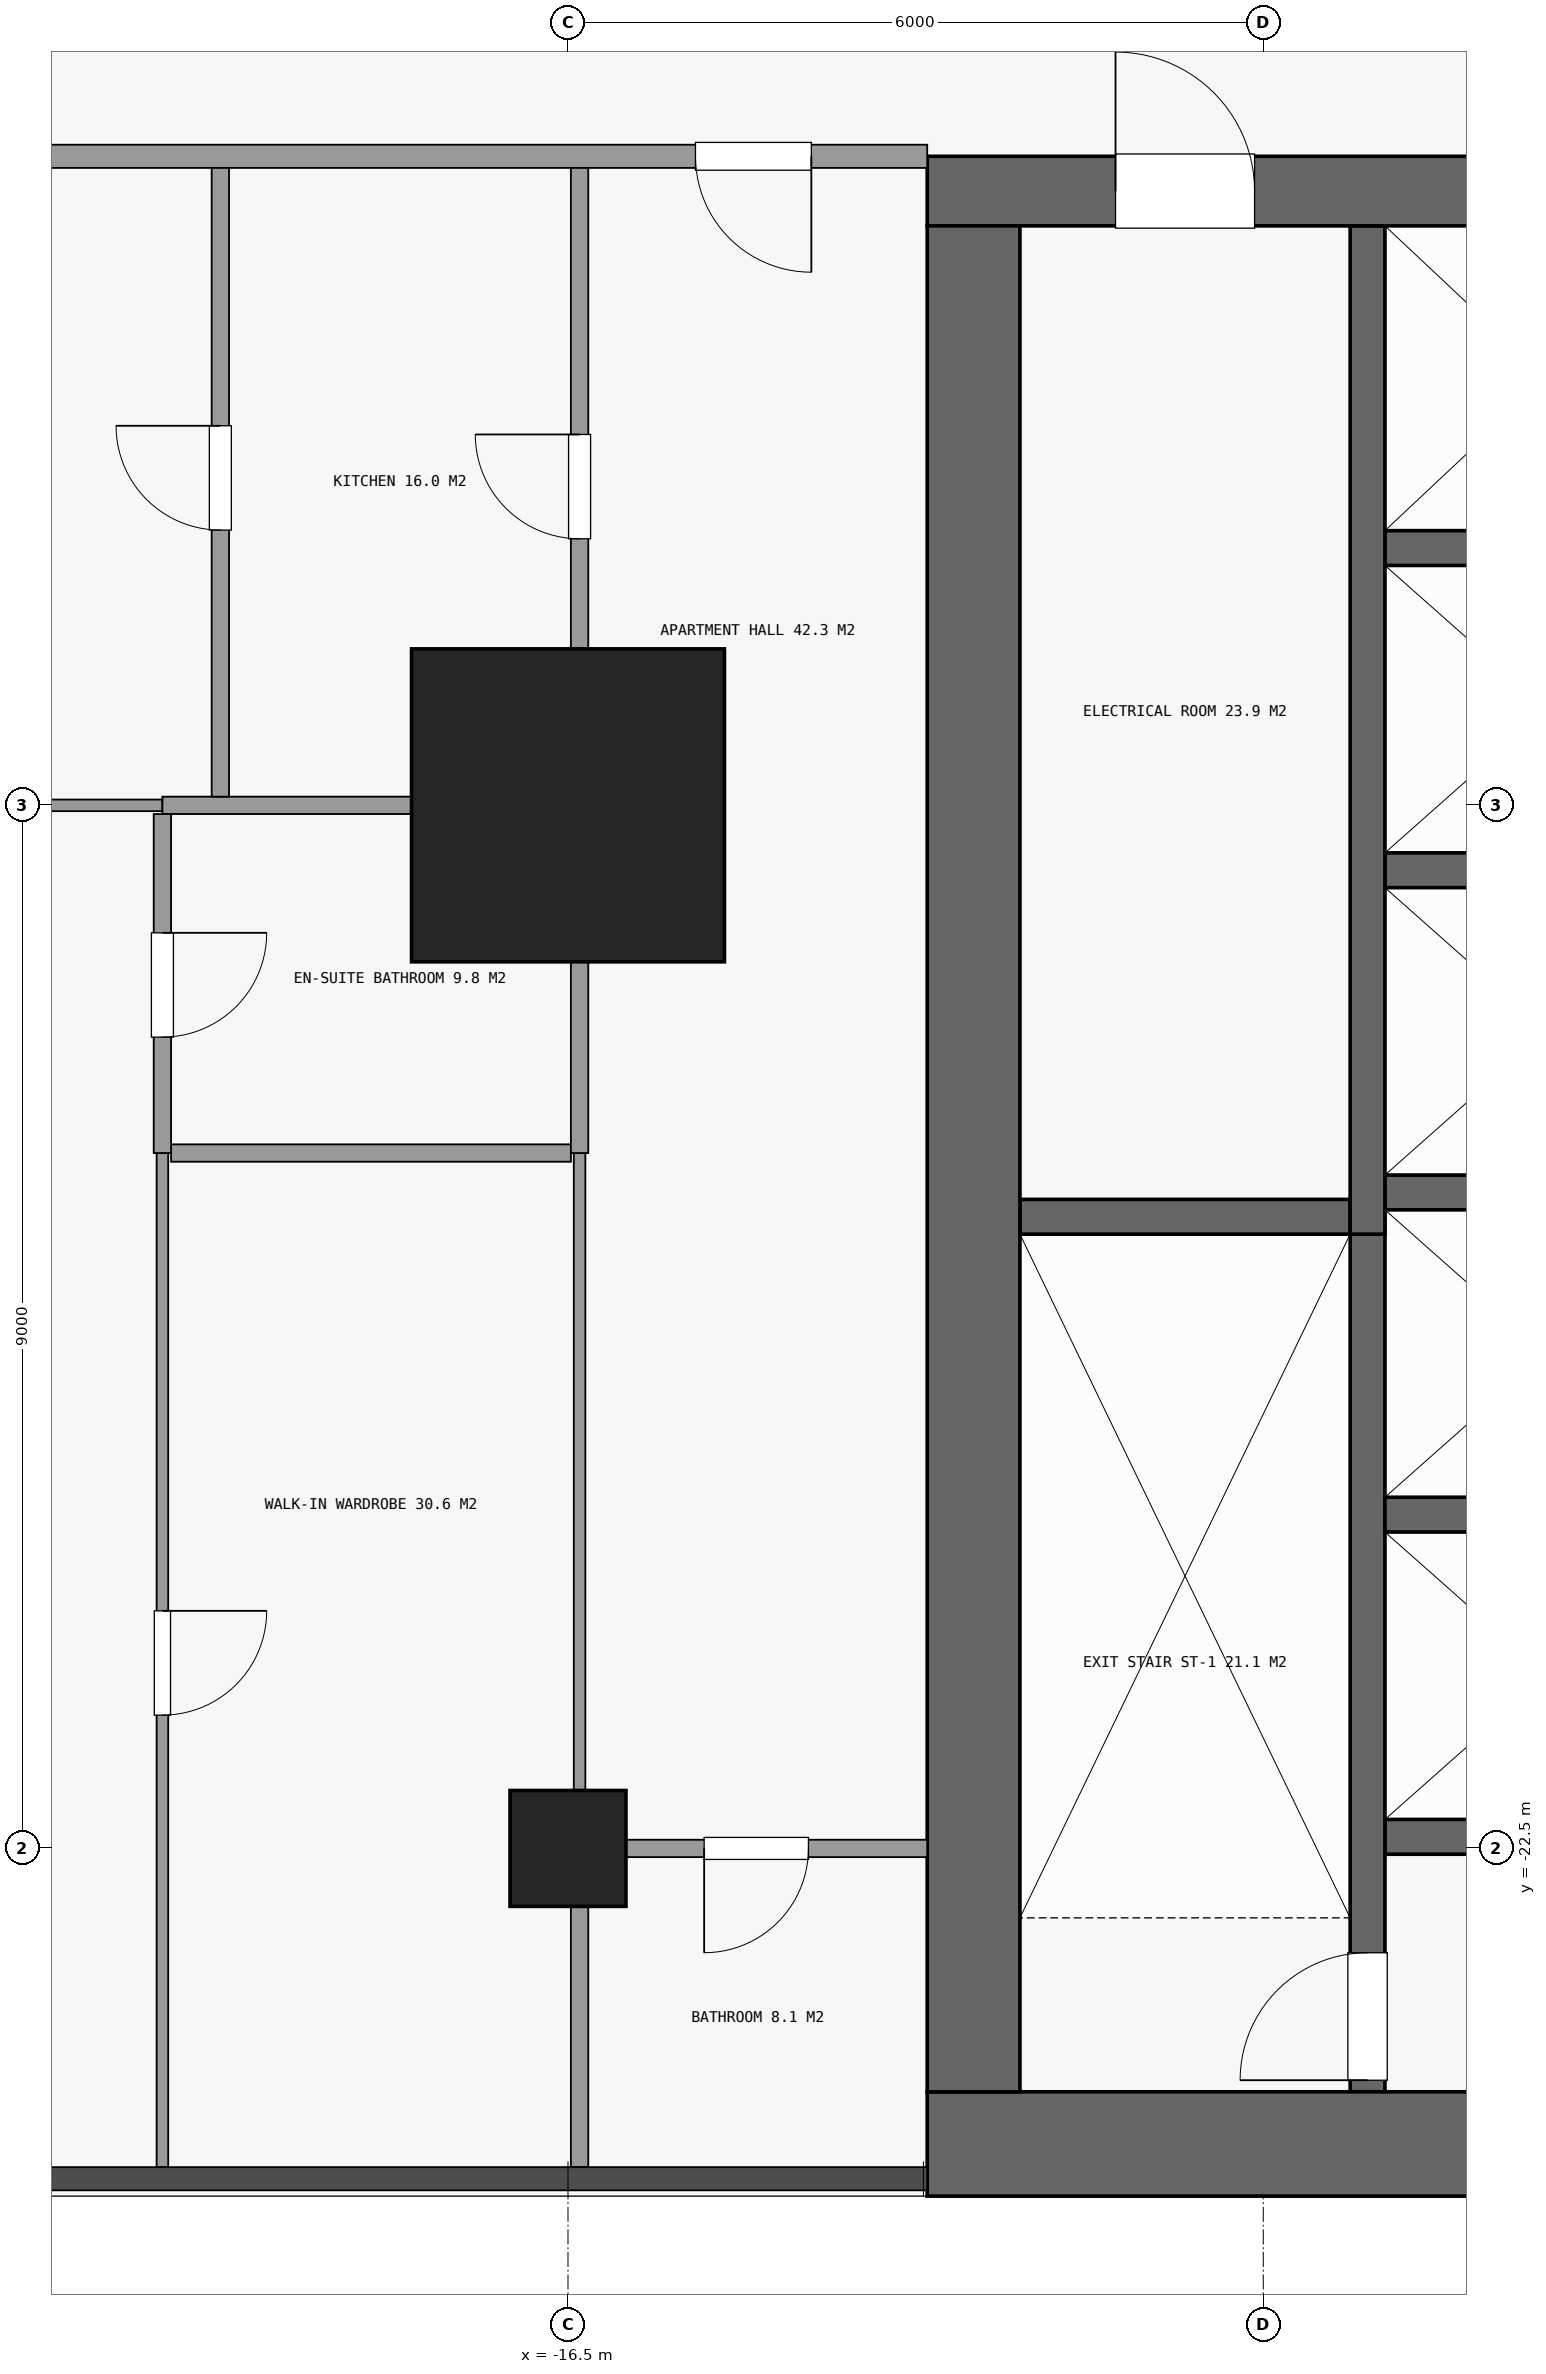
"""IFC4 building model, lengths in metres.
Left out: names, types, materials, properties, quantities, classifications, styles, units other than length and angle.
Written with IfcOpenShell. Run it as: python <this file> out.ifc"""

import sys

from ifc_helpers import new_model, si_unit, direction, frame, frame_2d, origin, origin_2d, place, context, subcontext, project, spatial, rectangle, extrude, element, fill, save


model = new_model("IFC4")
c1 = context("Model", 3, precision=1e-05, world=origin(), true_north=direction((0.0, 1.0)))
c2 = subcontext(c1, "Body", "Model", "MODEL_VIEW")
j1 = project(units=[si_unit("LENGTHUNIT", "METRE"), si_unit("PLANEANGLEUNIT", "RADIAN")], contexts=[c1])
p1 = place(None, origin())
s1 = spatial("IfcSite", under=j1, at=p1, CompositionType="ELEMENT")
p2 = place(p1, origin())
s2 = spatial("IfcBuilding", under=s1, at=p2, CompositionType="ELEMENT")
p3 = place(p2, frame((0.0, 0.0, 113.5)))
s3 = spatial("IfcBuildingStorey", under=s2, at=p3, CompositionType="ELEMENT", Elevation=113.5)
p4 = place(p3, frame((-16.5, -22.5, 0.0), z_axis=(0.0, 0.0, 1.0), x_axis=(1.0, 0.0, 0.0)))
e1 = element("IfcColumn", 1, at=p4, inside=s3, PredefinedType="COLUMN", context=c2, shape_type="SweptSolid", body=[
    extrude(rectangle(XDim=1.0, YDim=1.0, at=origin_2d()), origin(), (0.0, 0.0, 1.0), 3.6),
])
p5 = place(p3, frame((-16.5, -13.5, 0.0), z_axis=(0.0, 0.0, 1.0), x_axis=(1.0, 0.0, 0.0)))
e2 = element("IfcColumn", 2, at=p5, inside=s3, PredefinedType="COLUMN", context=c2, shape_type="SweptSolid", body=[
    extrude(rectangle(XDim=2.7, YDim=2.7, at=origin_2d()), origin(), (0.0, 0.0, 1.0), 3.6),
])
p6 = place(p3, frame((-13.4, -25.05, 0.0), z_axis=(0.0, 0.0, 1.0), x_axis=(1.0, 0.0, 0.0)))
e3 = element("IfcWall", 3, at=p6, inside=s3, PredefinedType="SHEAR", context=c2, shape_type="SweptSolid", body=[
    extrude(rectangle(XDim=26.8, YDim=0.9, at=frame_2d((13.4, 0.0))), origin(), (0.0, 0.0, 1.0), 3.3),
])
p7 = place(p3, frame((-13.4, -8.2, 0.0), z_axis=(0.0, 0.0, 1.0), x_axis=(1.0, 0.0, 0.0)))
e4 = element("IfcWall", 4, at=p7, inside=s3, PredefinedType="SHEAR", context=c2, shape_type="SweptSolid", body=[
    extrude(rectangle(XDim=26.8, YDim=0.6, at=frame_2d((13.4, 0.0))), origin(), (0.0, 0.0, 1.0), 3.3),
])
p8 = place(p7, frame((7.7, 0.0, 0.0)))
e5 = element("IfcOpeningElement", 5, at=p8, cuts=e4, PredefinedType="OPENING", context=c2, shape_type="SweptSolid", body=[
    extrude(rectangle(XDim=1.8, YDim=2.1, at=frame_2d((0.9, 1.05))), frame((0.0, 0.31, 0.0), z_axis=(0.0, -1.0, 0.0), x_axis=(1.0, 0.0, 0.0)), (0.0, 0.0, 1.0), 0.62),
])
p9 = place(p7, frame((17.3, 0.0, 0.0)))
e6 = element("IfcOpeningElement", 6, at=p9, cuts=e4, PredefinedType="OPENING", context=c2, shape_type="SweptSolid", body=[
    extrude(rectangle(XDim=1.8, YDim=2.1, at=frame_2d((0.9, 1.05))), frame((0.0, 0.31, 0.0), z_axis=(0.0, -1.0, 0.0), x_axis=(1.0, 0.0, 0.0)), (0.0, 0.0, 1.0), 0.62),
])
p10 = place(p7, frame((1.625, 0.0, 0.0)))
e7 = element("IfcOpeningElement", 7, at=p10, cuts=e4, PredefinedType="OPENING", context=c2, shape_type="SweptSolid", body=[
    extrude(rectangle(XDim=1.2, YDim=2.1, at=frame_2d((0.6, 1.05))), frame((0.0, 0.31, 0.0), z_axis=(0.0, -1.0, 0.0), x_axis=(1.0, 0.0, 0.0)), (0.0, 0.0, 1.0), 0.62),
])
p11 = place(p7, frame((23.275, 0.0, 0.0)))
e8 = element("IfcOpeningElement", 8, at=p11, cuts=e4, PredefinedType="OPENING", context=c2, shape_type="SweptSolid", body=[
    extrude(rectangle(XDim=0.9, YDim=2.1, at=frame_2d((0.45, 1.05))), frame((0.0, 0.31, 0.0), z_axis=(0.0, -1.0, 0.0), x_axis=(1.0, 0.0, 0.0)), (0.0, 0.0, 1.0), 0.62),
])
p12 = place(p3, frame((-13.0, -24.6, 0.0), z_axis=(0.0, 0.0, 1.0), x_axis=(0.0, 1.0, 0.0)))
e9 = element("IfcWall", 9, at=p12, inside=s3, PredefinedType="SHEAR", context=c2, shape_type="SweptSolid", body=[
    extrude(rectangle(XDim=16.1, YDim=0.8, at=frame_2d((8.05, 0.0))), origin(), (0.0, 0.0, 1.0), 3.3),
])
for number, where, z_axis, x_axis in (
    (10, (-9.45, -22.4, 0.0), (0.0, 0.0, 1.0), (1.0, 0.0, 0.0)),
    (11, (-9.45, -19.62, 0.0), (0.0, 0.0, 1.0), (1.0, 0.0, 0.0)),
):
    element("IfcWall", number, at=place(p3, frame(where, z_axis=z_axis, x_axis=x_axis)), inside=s3, PredefinedType="SHEAR", context=c2, shape_type="SweptSolid", body=[
        extrude(rectangle(XDim=2.8, YDim=0.3, at=frame_2d((1.4, 0.0))), origin(), (0.0, 0.0, 1.0), 3.3),
    ])
p13 = place(p3, frame((-12.6, -17.05, 0.0), z_axis=(0.0, 0.0, 1.0), x_axis=(1.0, 0.0, 0.0)))
e12 = element("IfcWall", 12, at=p13, inside=s3, PredefinedType="SHEAR", context=c2, shape_type="SweptSolid", body=[
    extrude(rectangle(XDim=2.85, YDim=0.3, at=frame_2d((1.425, 0.0))), origin(), (0.0, 0.0, 1.0), 3.3),
])
for number, where, z_axis, x_axis in (
    (13, (-9.45, -16.84, 0.0), (0.0, 0.0, 1.0), (1.0, 0.0, 0.0)),
    (14, (-9.45, -14.06, 0.0), (0.0, 0.0, 1.0), (1.0, 0.0, 0.0)),
    (15, (-9.45, -11.28, 0.0), (0.0, 0.0, 1.0), (1.0, 0.0, 0.0)),
):
    element("IfcWall", number, at=place(p3, frame(where, z_axis=z_axis, x_axis=x_axis)), inside=s3, PredefinedType="SHEAR", context=c2, shape_type="SweptSolid", body=[
        extrude(rectangle(XDim=2.8, YDim=0.3, at=frame_2d((1.4, 0.0))), origin(), (0.0, 0.0, 1.0), 3.3),
    ])
p14 = place(p3, frame((-9.6, -24.6, 0.0), z_axis=(0.0, 0.0, 1.0), x_axis=(0.0, 1.0, 0.0)))
e16 = element("IfcWall", 16, at=p14, inside=s3, PredefinedType="SHEAR", context=c2, shape_type="SweptSolid", body=[
    extrude(rectangle(XDim=7.7, YDim=0.3, at=frame_2d((3.85, 0.0))), origin(), (0.0, 0.0, 1.0), 3.3),
])
p15 = place(p14, frame((0.1, 0.0, 0.0)))
e17 = element("IfcOpeningElement", 17, at=p15, cuts=e16, PredefinedType="OPENING", context=c2, shape_type="SweptSolid", body=[
    extrude(rectangle(XDim=1.1, YDim=2.1, at=frame_2d((0.55, 1.05))), frame((0.0, 0.16, 0.0), z_axis=(0.0, -1.0, 0.0), x_axis=(1.0, 0.0, 0.0)), (0.0, 0.0, 1.0), 0.32),
])
p16 = place(p3, frame((-9.6, -17.2, 0.0), z_axis=(0.0, 0.0, 1.0), x_axis=(0.0, 1.0, 0.0)))
e18 = element("IfcWall", 18, at=p16, inside=s3, PredefinedType="SHEAR", context=c2, shape_type="SweptSolid", body=[
    extrude(rectangle(XDim=8.7, YDim=0.3, at=frame_2d((4.35, 0.0))), origin(), (0.0, 0.0, 1.0), 3.3),
])
p17 = place(p3, frame((-16.325, -22.5, 0.0), z_axis=(0.0, 0.0, 1.0), x_axis=(1.0, 0.0, 0.0)))
e19 = element("IfcWall", 19, at=p17, inside=s3, PredefinedType="PARTITIONING", context=c2, shape_type="SweptSolid", body=[
    extrude(rectangle(XDim=2.925, YDim=0.15, at=frame_2d((1.462, 0.0))), origin(), (0.0, 0.0, 1.0), 3.3),
])
p18 = place(p17, frame((1.0, 0.0, 0.0)))
e20 = element("IfcOpeningElement", 20, at=p18, cuts=e19, PredefinedType="OPENING", context=c2, shape_type="SweptSolid", body=[
    extrude(rectangle(XDim=0.9, YDim=2.1, at=frame_2d((0.45, 1.05))), frame((0.0, 0.085, 0.0), z_axis=(0.0, -1.0, 0.0), x_axis=(1.0, 0.0, 0.0)), (0.0, 0.0, 1.0), 0.17),
])
p19 = place(p3, frame((-19.925, -16.5, 0.0), z_axis=(0.0, 0.0, 1.0), x_axis=(1.0, 0.0, 0.0)))
e21 = element("IfcWall", 21, at=p19, inside=s3, PredefinedType="PARTITIONING", context=c2, shape_type="SweptSolid", body=[
    extrude(rectangle(XDim=3.45, YDim=0.15, at=frame_2d((1.725, 0.0))), origin(), (0.0, 0.0, 1.0), 3.3),
])
p20 = place(p3, frame((-25.25, -13.5, 0.0), z_axis=(0.0, 0.0, 1.0), x_axis=(1.0, 0.0, 0.0)))
e22 = element("IfcWall", 22, at=p20, inside=s3, PredefinedType="PARTITIONING", context=c2, shape_type="SweptSolid", body=[
    extrude(rectangle(XDim=5.25, YDim=0.1, at=frame_2d((2.625, 0.0))), origin(), (0.0, 0.0, 1.0), 3.3),
])
p21 = place(p20, frame((1.2, 0.0, 0.0)))
e23 = element("IfcOpeningElement", 23, at=p21, cuts=e22, PredefinedType="OPENING", context=c2, shape_type="SweptSolid", body=[
    extrude(rectangle(XDim=0.9, YDim=2.1, at=frame_2d((0.45, 1.05))), frame((0.0, 0.06, 0.0), z_axis=(0.0, -1.0, 0.0), x_axis=(1.0, 0.0, 0.0)), (0.0, 0.0, 1.0), 0.12),
])
p22 = place(p3, frame((-20.0, -13.5, 0.0), z_axis=(0.0, 0.0, 1.0), x_axis=(1.0, 0.0, 0.0)))
e24 = element("IfcWall", 24, at=p22, inside=s3, PredefinedType="PARTITIONING", context=c2, shape_type="SweptSolid", body=[
    extrude(rectangle(XDim=3.525, YDim=0.15, at=frame_2d((1.762, 0.0))), origin(), (0.0, 0.0, 1.0), 3.3),
])
p23 = place(p3, frame((-26.15, -7.9, 0.0), z_axis=(0.0, 0.0, 1.0), x_axis=(1.0, 0.0, 0.0)))
e25 = element("IfcWall", 25, at=p23, inside=s3, PredefinedType="PARTITIONING", context=c2, shape_type="SweptSolid", body=[
    extrude(rectangle(XDim=12.75, YDim=0.2, at=frame_2d((6.375, 0.0))), origin(), (0.0, 0.0, 1.0), 3.3),
])
p24 = place(p23, frame((10.75, 0.0, 0.0)))
e26 = element("IfcOpeningElement", 26, at=p24, cuts=e25, PredefinedType="OPENING", context=c2, shape_type="SweptSolid", body=[
    extrude(rectangle(XDim=1.0, YDim=2.1, at=frame_2d((0.5, 1.05))), frame((0.0, 0.11, 0.0), z_axis=(0.0, -1.0, 0.0), x_axis=(1.0, 0.0, 0.0)), (0.0, 0.0, 1.0), 0.22),
])
p25 = place(p3, frame((-20.0, -25.25, 0.0), z_axis=(0.0, 0.0, 1.0), x_axis=(0.0, 1.0, 0.0)))
e27 = element("IfcWall", 27, at=p25, inside=s3, PredefinedType="PARTITIONING", context=c2, shape_type="SweptSolid", body=[
    extrude(rectangle(XDim=8.75, YDim=0.1, at=frame_2d((4.375, 0.0))), origin(), (0.0, 0.0, 1.0), 3.3),
])
p26 = place(p25, frame((3.9, 0.0, 0.0)))
e28 = element("IfcOpeningElement", 28, at=p26, cuts=e27, PredefinedType="OPENING", context=c2, shape_type="SweptSolid", body=[
    extrude(rectangle(XDim=0.9, YDim=2.1, at=frame_2d((0.45, 1.05))), frame((0.0, 0.06, 0.0), z_axis=(0.0, -1.0, 0.0), x_axis=(1.0, 0.0, 0.0)), (0.0, 0.0, 1.0), 0.12),
])
p27 = place(p3, frame((-20.0, -16.5, 0.0), z_axis=(0.0, 0.0, 1.0), x_axis=(0.0, 1.0, 0.0)))
e29 = element("IfcWall", 29, at=p27, inside=s3, PredefinedType="PARTITIONING", context=c2, shape_type="SweptSolid", body=[
    extrude(rectangle(XDim=2.925, YDim=0.15, at=frame_2d((1.462, 0.0))), origin(), (0.0, 0.0, 1.0), 3.3),
])
p28 = place(p27, frame((1.0, 0.0, 0.0)))
e30 = element("IfcOpeningElement", 30, at=p28, cuts=e29, PredefinedType="OPENING", context=c2, shape_type="SweptSolid", body=[
    extrude(rectangle(XDim=0.9, YDim=2.1, at=frame_2d((0.45, 1.05))), frame((0.0, 0.085, 0.0), z_axis=(0.0, -1.0, 0.0), x_axis=(1.0, 0.0, 0.0)), (0.0, 0.0, 1.0), 0.17),
])
p29 = place(p3, frame((-19.5, -13.425, 0.0), z_axis=(0.0, 0.0, 1.0), x_axis=(0.0, 1.0, 0.0)))
e31 = element("IfcWall", 31, at=p29, inside=s3, PredefinedType="PARTITIONING", context=c2, shape_type="SweptSolid", body=[
    extrude(rectangle(XDim=5.425, YDim=0.15, at=frame_2d((2.712, 0.0))), origin(), (0.0, 0.0, 1.0), 3.3),
])
p30 = place(p29, frame((2.3, 0.0, 0.0)))
e32 = element("IfcOpeningElement", 32, at=p30, cuts=e31, PredefinedType="OPENING", context=c2, shape_type="SweptSolid", body=[
    extrude(rectangle(XDim=0.9, YDim=2.1, at=frame_2d((0.45, 1.05))), frame((0.0, 0.085, 0.0), z_axis=(0.0, -1.0, 0.0), x_axis=(1.0, 0.0, 0.0)), (0.0, 0.0, 1.0), 0.17),
])
p31 = place(p3, frame((-16.4, -22.5, 0.0), z_axis=(0.0, 0.0, 1.0), x_axis=(0.0, 1.0, 0.0)))
e33 = element("IfcWall", 33, at=p31, inside=s3, PredefinedType="PARTITIONING", context=c2, shape_type="SweptSolid", body=[
    extrude(rectangle(XDim=6.0, YDim=0.1, at=frame_2d((3.0, 0.0))), origin(), (0.0, 0.0, 1.0), 3.3),
])
p32 = place(p3, frame((-16.4, -25.25, 0.0), z_axis=(0.0, 0.0, 1.0), x_axis=(0.0, 1.0, 0.0)))
e34 = element("IfcWall", 34, at=p32, inside=s3, PredefinedType="PARTITIONING", context=c2, shape_type="SweptSolid", body=[
    extrude(rectangle(XDim=2.75, YDim=0.15, at=frame_2d((1.375, 0.0))), origin(), (0.0, 0.0, 1.0), 3.3),
])
p33 = place(p3, frame((-16.4, -16.5, 0.0), z_axis=(0.0, 0.0, 1.0), x_axis=(0.0, 1.0, 0.0)))
e35 = element("IfcWall", 35, at=p33, inside=s3, PredefinedType="PARTITIONING", context=c2, shape_type="SweptSolid", body=[
    extrude(rectangle(XDim=8.5, YDim=0.15, at=frame_2d((4.25, 0.0))), origin(), (0.0, 0.0, 1.0), 3.3),
])
p34 = place(p33, frame((5.3, 0.0, 0.0)))
e36 = element("IfcOpeningElement", 36, at=p34, cuts=e35, PredefinedType="OPENING", context=c2, shape_type="SweptSolid", body=[
    extrude(rectangle(XDim=0.9, YDim=2.1, at=frame_2d((0.45, 1.05))), frame((0.0, 0.085, 0.0), z_axis=(0.0, -1.0, 0.0), x_axis=(1.0, 0.0, 0.0)), (0.0, 0.0, 1.0), 0.17),
])
p35 = place(p10, origin())
e37 = element("IfcDoor", 37, at=p35, inside=s3, OperationType="SINGLE_SWING_LEFT", PredefinedType="DOOR", context=c2, shape_type="SweptSolid", body=[
    extrude(rectangle(XDim=1.2, YDim=2.1, at=frame_2d((0.6, 1.05))), frame((0.0, 0.025, 0.0), z_axis=(0.0, -1.0, 0.0), x_axis=(1.0, 0.0, 0.0)), (0.0, 0.0, 1.0), 0.05),
])
fill(e7, e37)
p36 = place(p15, origin())
e38 = element("IfcDoor", 38, at=p36, inside=s3, OperationType="SINGLE_SWING_LEFT", PredefinedType="DOOR", context=c2, shape_type="SweptSolid", body=[
    extrude(rectangle(XDim=1.1, YDim=2.1, at=frame_2d((0.55, 1.05))), frame((0.0, 0.025, 0.0), z_axis=(0.0, -1.0, 0.0), x_axis=(1.0, 0.0, 0.0)), (0.0, 0.0, 1.0), 0.05),
])
fill(e17, e38)
p37 = place(p18, origin())
e39 = element("IfcDoor", 39, at=p37, inside=s3, OperationType="SINGLE_SWING_LEFT", PredefinedType="DOOR", context=c2, shape_type="SweptSolid", body=[
    extrude(rectangle(XDim=0.9, YDim=2.1, at=frame_2d((0.45, 1.05))), frame((0.0, 0.025, 0.0), z_axis=(0.0, -1.0, 0.0), x_axis=(1.0, 0.0, 0.0)), (0.0, 0.0, 1.0), 0.05),
])
fill(e20, e39)
p38 = place(p24, origin())
e40 = element("IfcDoor", 40, at=p38, inside=s3, OperationType="SINGLE_SWING_RIGHT", PredefinedType="DOOR", context=c2, shape_type="SweptSolid", body=[
    extrude(rectangle(XDim=1.0, YDim=2.1, at=frame_2d((0.5, 1.05))), frame((0.0, 0.025, 0.0), z_axis=(0.0, -1.0, 0.0), x_axis=(1.0, 0.0, 0.0)), (0.0, 0.0, 1.0), 0.05),
])
fill(e26, e40)
p39 = place(p26, origin())
e41 = element("IfcDoor", 41, at=p39, inside=s3, OperationType="SINGLE_SWING_RIGHT", PredefinedType="DOOR", context=c2, shape_type="SweptSolid", body=[
    extrude(rectangle(XDim=0.9, YDim=2.1, at=frame_2d((0.45, 1.05))), frame((0.0, 0.025, 0.0), z_axis=(0.0, -1.0, 0.0), x_axis=(1.0, 0.0, 0.0)), (0.0, 0.0, 1.0), 0.05),
])
fill(e28, e41)
p40 = place(p28, origin())
e42 = element("IfcDoor", 42, at=p40, inside=s3, OperationType="SINGLE_SWING_RIGHT", PredefinedType="DOOR", context=c2, shape_type="SweptSolid", body=[
    extrude(rectangle(XDim=0.9, YDim=2.1, at=frame_2d((0.45, 1.05))), frame((0.0, 0.025, 0.0), z_axis=(0.0, -1.0, 0.0), x_axis=(1.0, 0.0, 0.0)), (0.0, 0.0, 1.0), 0.05),
])
fill(e30, e42)
p41 = place(p30, origin())
e43 = element("IfcDoor", 43, at=p41, inside=s3, OperationType="SINGLE_SWING_LEFT", PredefinedType="DOOR", context=c2, shape_type="SweptSolid", body=[
    extrude(rectangle(XDim=0.9, YDim=2.1, at=frame_2d((0.45, 1.05))), frame((0.0, 0.025, 0.0), z_axis=(0.0, -1.0, 0.0), x_axis=(1.0, 0.0, 0.0)), (0.0, 0.0, 1.0), 0.05),
])
fill(e32, e43)
p42 = place(p34, origin())
e44 = element("IfcDoor", 44, at=p42, inside=s3, OperationType="SINGLE_SWING_LEFT", PredefinedType="DOOR", context=c2, shape_type="SweptSolid", body=[
    extrude(rectangle(XDim=0.9, YDim=2.1, at=frame_2d((0.45, 1.05))), frame((0.0, 0.025, 0.0), z_axis=(0.0, -1.0, 0.0), x_axis=(1.0, 0.0, 0.0)), (0.0, 0.0, 1.0), 0.05),
])
fill(e36, e44)
save(model, sys.argv[1])
